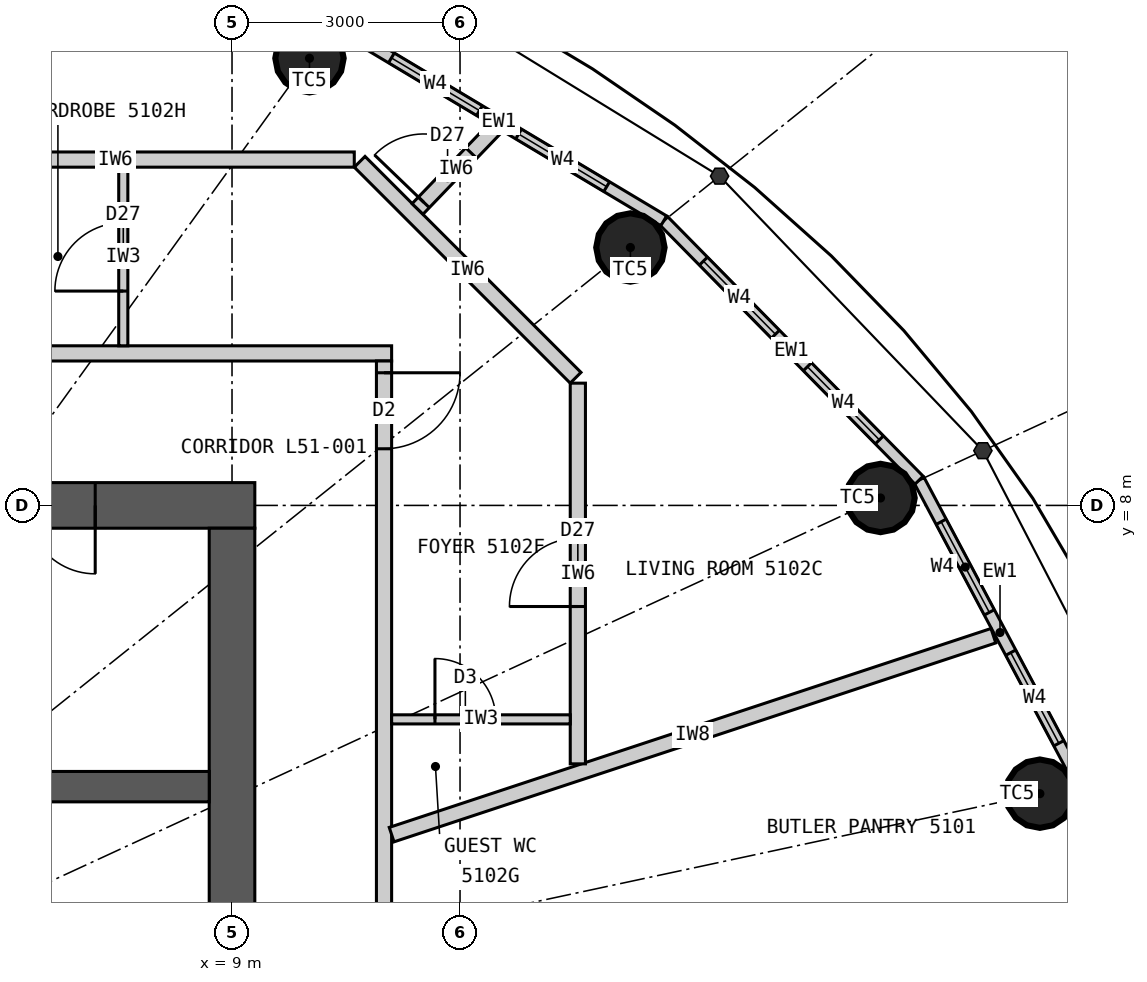
"""IFC4 building model, lengths in metres.
Left out: names, types, materials, properties, quantities, classifications, styles, units other than length and angle.
Written with IfcOpenShell. Run it as: python <this file> out.ifc"""

import sys

from ifc_helpers import new_model, si_unit, direction, frame, frame_2d, origin, origin_2d, place, context, subcontext, project, spatial, rectangle, circle, extrude, element, fill, save


model = new_model("IFC4")
c1 = context("Model", 3, precision=1e-05, world=origin(), true_north=direction((0.0, 1.0)))
c2 = subcontext(c1, "Body", "Model", "MODEL_VIEW")
j1 = project(units=[si_unit("LENGTHUNIT", "METRE"), si_unit("PLANEANGLEUNIT", "RADIAN")], contexts=[c1])
p1 = place(None, origin())
s1 = spatial("IfcSite", under=j1, at=p1, CompositionType="ELEMENT")
p2 = place(p1, origin())
s2 = spatial("IfcBuilding", under=s1, at=p2, CompositionType="ELEMENT")
p3 = place(p2, frame((0.0, 0.0, 192.9)))
s3 = spatial("IfcBuildingStorey", under=s2, at=p3, CompositionType="ELEMENT", Elevation=192.9)
for number, where, z_axis, x_axis in (
    (1, (19.629, 4.208, 0.0), (0.0, 0.0, 1.0), (1.0, 0.0, 0.0)),
    (2, (17.532, 8.098, 0.0), (0.0, 0.0, 1.0), (1.0, 0.0, 0.0)),
    (3, (14.241, 11.393, 0.0), (0.0, 0.0, 1.0), (1.0, 0.0, 0.0)),
    (4, (10.019, 13.883, 0.0), (0.0, 0.0, 1.0), (1.0, 0.0, 0.0)),
):
    element("IfcColumn", number, at=place(p3, frame(where, z_axis=z_axis, x_axis=x_axis)), inside=s3, PredefinedType="COLUMN", context=c2, shape_type="SweptSolid", body=[
        extrude(circle(Radius=0.45, at=origin_2d()), origin(), (0.0, 0.0, 1.0), 3.3),
    ])
p4 = place(p3, frame((-9.3, 8.0, 0.0), z_axis=(0.0, 0.0, 1.0), x_axis=(1.0, 0.0, 0.0)))
e5 = element("IfcWall", 5, at=p4, inside=s3, PredefinedType="SHEAR", context=c2, shape_type="SweptSolid", body=[
    extrude(rectangle(XDim=18.6, YDim=0.6, at=frame_2d((9.3, 0.0))), origin(), (0.0, 0.0, 1.0), 3.3),
])
p5 = place(p4, frame((8.0, 0.0, 0.0)))
e6 = element("IfcOpeningElement", 6, at=p5, cuts=e5, PredefinedType="OPENING", context=c2, shape_type="SweptSolid", body=[
    extrude(rectangle(XDim=1.2, YDim=2.2, at=frame_2d((0.6, 1.1))), frame((0.0, 0.31, 0.0), z_axis=(0.0, -1.0, 0.0), x_axis=(1.0, 0.0, 0.0)), (0.0, 0.0, 1.0), 0.62),
])
p6 = place(p4, frame((15.6, 0.0, 0.0)))
e7 = element("IfcOpeningElement", 7, at=p6, cuts=e5, PredefinedType="OPENING", context=c2, shape_type="SweptSolid", body=[
    extrude(rectangle(XDim=0.9, YDim=2.2, at=frame_2d((0.45, 1.1))), frame((0.0, 0.31, 0.0), z_axis=(0.0, -1.0, 0.0), x_axis=(1.0, 0.0, 0.0)), (0.0, 0.0, 1.0), 0.62),
])
p7 = place(p3, frame((9.0, -7.7, 0.0), z_axis=(0.0, 0.0, 1.0), x_axis=(0.0, 1.0, 0.0)))
e8 = element("IfcWall", 8, at=p7, inside=s3, PredefinedType="SHEAR", context=c2, shape_type="SweptSolid", body=[
    extrude(rectangle(XDim=15.4, YDim=0.6, at=frame_2d((7.7, 0.0))), origin(), (0.0, 0.0, 1.0), 3.3),
])
p8 = place(p7, frame((6.8, 0.0, 0.0)))
e9 = element("IfcOpeningElement", 9, at=p8, cuts=e8, PredefinedType="OPENING", context=c2, shape_type="SweptSolid", body=[
    extrude(rectangle(XDim=1.8, YDim=2.2, at=frame_2d((0.9, 1.1))), frame((0.0, 0.31, 0.0), z_axis=(0.0, -1.0, 0.0), x_axis=(1.0, 0.0, 0.0)), (0.0, 0.0, 1.0), 0.62),
])
p9 = place(p3, frame((-8.7, 4.3, 0.0), z_axis=(0.0, 0.0, 1.0), x_axis=(1.0, 0.0, 0.0)))
e10 = element("IfcWall", 10, at=p9, inside=s3, PredefinedType="SHEAR", context=c2, shape_type="SweptSolid", body=[
    extrude(rectangle(XDim=17.4, YDim=0.4, at=frame_2d((8.7, 0.0))), origin(), (0.0, 0.0, 1.0), 3.3),
])
p10 = place(p3, frame((20.17, 4.323, 0.0), z_axis=(0.0, 0.0, 1.0), x_axis=(-0.469256152955, 0.883062094597, 0.0)))
e11 = element("IfcWall", 11, at=p10, inside=s3, PredefinedType="ELEMENTEDWALL", context=c2, shape_type="SweptSolid", body=[
    extrude(rectangle(XDim=4.539, YDim=0.15, at=frame_2d((2.27, 0.0))), origin(), (0.0, 0.0, 1.0), 3.12),
])
p11 = place(p10, frame((0.62, 0.0, 0.9)))
e12 = element("IfcOpeningElement", 12, at=p11, cuts=e11, PredefinedType="OPENING", context=c2, shape_type="SweptSolid", body=[
    extrude(rectangle(XDim=1.35, YDim=1.9, at=frame_2d((0.675, 0.95))), frame((0.0, 0.085, 0.0), z_axis=(0.0, -1.0, 0.0), x_axis=(1.0, 0.0, 0.0)), (0.0, 0.0, 1.0), 0.17),
])
p12 = place(p10, frame((2.57, 0.0, 0.9)))
e13 = element("IfcOpeningElement", 13, at=p12, cuts=e11, PredefinedType="OPENING", context=c2, shape_type="SweptSolid", body=[
    extrude(rectangle(XDim=1.35, YDim=1.9, at=frame_2d((0.675, 0.95))), frame((0.0, 0.085, 0.0), z_axis=(0.0, -1.0, 0.0), x_axis=(1.0, 0.0, 0.0)), (0.0, 0.0, 1.0), 0.17),
])
p13 = place(p3, frame((18.04, 8.332, 0.0), z_axis=(0.0, 0.0, 1.0), x_axis=(-0.701527379618, 0.712642501993, 0.0)))
e14 = element("IfcWall", 14, at=p13, inside=s3, PredefinedType="ELEMENTEDWALL", context=c2, shape_type="SweptSolid", body=[
    extrude(rectangle(XDim=4.788, YDim=0.15, at=frame_2d((2.394, 0.0))), origin(), (0.0, 0.0, 1.0), 3.12),
])
p14 = place(p13, frame((0.744, 0.0, 0.9)))
e15 = element("IfcOpeningElement", 15, at=p14, cuts=e14, PredefinedType="OPENING", context=c2, shape_type="SweptSolid", body=[
    extrude(rectangle(XDim=1.35, YDim=1.9, at=frame_2d((0.675, 0.95))), frame((0.0, 0.085, 0.0), z_axis=(0.0, -1.0, 0.0), x_axis=(1.0, 0.0, 0.0)), (0.0, 0.0, 1.0), 0.17),
])
p15 = place(p13, frame((2.694, 0.0, 0.9)))
e16 = element("IfcOpeningElement", 16, at=p15, cuts=e14, PredefinedType="OPENING", context=c2, shape_type="SweptSolid", body=[
    extrude(rectangle(XDim=1.35, YDim=1.9, at=frame_2d((0.675, 0.95))), frame((0.0, 0.085, 0.0), z_axis=(0.0, -1.0, 0.0), x_axis=(1.0, 0.0, 0.0)), (0.0, 0.0, 1.0), 0.17),
])
p16 = place(p3, frame((14.68, 11.744, 0.0), z_axis=(0.0, 0.0, 1.0), x_axis=(-0.85822150553, 0.513279502265, 0.0)))
e17 = element("IfcWall", 17, at=p16, inside=s3, PredefinedType="ELEMENTEDWALL", context=c2, shape_type="SweptSolid", body=[
    extrude(rectangle(XDim=5.05, YDim=0.15, at=frame_2d((2.525, 0.0))), origin(), (0.0, 0.0, 1.0), 3.12),
])
p17 = place(p16, frame((0.875, 0.0, 0.9)))
e18 = element("IfcOpeningElement", 18, at=p17, cuts=e17, PredefinedType="OPENING", context=c2, shape_type="SweptSolid", body=[
    extrude(rectangle(XDim=1.35, YDim=1.9, at=frame_2d((0.675, 0.95))), frame((0.0, 0.085, 0.0), z_axis=(0.0, -1.0, 0.0), x_axis=(1.0, 0.0, 0.0)), (0.0, 0.0, 1.0), 0.17),
])
p18 = place(p16, frame((2.825, 0.0, 0.9)))
e19 = element("IfcOpeningElement", 19, at=p18, cuts=e17, PredefinedType="OPENING", context=c2, shape_type="SweptSolid", body=[
    extrude(rectangle(XDim=1.35, YDim=1.9, at=frame_2d((0.675, 0.95))), frame((0.0, 0.085, 0.0), z_axis=(0.0, -1.0, 0.0), x_axis=(1.0, 0.0, 0.0)), (0.0, 0.0, 1.0), 0.17),
])
p19 = place(p3, frame((-11.1, 10.0, 0.0), z_axis=(0.0, 0.0, 1.0), x_axis=(1.0, 0.0, 0.0)))
e20 = element("IfcWall", 20, at=p19, inside=s3, PredefinedType="PARTITIONING", context=c2, shape_type="SweptSolid", body=[
    extrude(rectangle(XDim=22.2, YDim=0.2, at=frame_2d((11.1, 0.0))), origin(), (0.0, 0.0, 1.0), 3.12),
])
p20 = place(p19, frame((11.36, 0.0, 0.0)))
e21 = element("IfcOpeningElement", 21, at=p20, cuts=e20, PredefinedType="OPENING", context=c2, shape_type="SweptSolid", body=[
    extrude(rectangle(XDim=1.0, YDim=2.2, at=frame_2d((0.5, 1.1))), frame((0.0, 0.11, 0.0), z_axis=(0.0, -1.0, 0.0), x_axis=(1.0, 0.0, 0.0)), (0.0, 0.0, 1.0), 0.22),
])
p21 = place(p19, frame((0.975, 0.0, 0.0)))
e22 = element("IfcOpeningElement", 22, at=p21, cuts=e20, PredefinedType="OPENING", context=c2, shape_type="SweptSolid", body=[
    extrude(rectangle(XDim=1.0, YDim=2.2, at=frame_2d((0.5, 1.1))), frame((0.0, 0.11, 0.0), z_axis=(0.0, -1.0, 0.0), x_axis=(1.0, 0.0, 0.0)), (0.0, 0.0, 1.0), 0.22),
])
p22 = place(p3, frame((11.0, -9.9, 0.0), z_axis=(0.0, 0.0, 1.0), x_axis=(0.0, 1.0, 0.0)))
e23 = element("IfcWall", 23, at=p22, inside=s3, PredefinedType="PARTITIONING", context=c2, shape_type="SweptSolid", body=[
    extrude(rectangle(XDim=19.8, YDim=0.2, at=frame_2d((9.9, 0.0))), origin(), (0.0, 0.0, 1.0), 3.12),
])
p23 = place(p22, frame((11.486, 0.0, 0.0)))
e24 = element("IfcOpeningElement", 24, at=p23, cuts=e23, PredefinedType="OPENING", context=c2, shape_type="SweptSolid", body=[
    extrude(rectangle(XDim=1.0, YDim=2.2, at=frame_2d((0.5, 1.1))), frame((0.0, 0.11, 0.0), z_axis=(0.0, -1.0, 0.0), x_axis=(1.0, 0.0, 0.0)), (0.0, 0.0, 1.0), 0.22),
])
p24 = place(p22, frame((18.645, 0.0, 0.0)))
e25 = element("IfcOpeningElement", 25, at=p24, cuts=e23, PredefinedType="OPENING", context=c2, shape_type="SweptSolid", body=[
    extrude(rectangle(XDim=1.0, YDim=2.2, at=frame_2d((0.5, 1.1))), frame((0.0, 0.11, 0.0), z_axis=(0.0, -1.0, 0.0), x_axis=(1.0, 0.0, 0.0)), (0.0, 0.0, 1.0), 0.22),
])
p25 = place(p22, frame((5.668, 0.0, 0.0)))
e26 = element("IfcOpeningElement", 26, at=p25, cuts=e23, PredefinedType="OPENING", context=c2, shape_type="SweptSolid", body=[
    extrude(rectangle(XDim=1.6, YDim=2.2, at=frame_2d((0.8, 1.1))), frame((0.0, 0.11, 0.0), z_axis=(0.0, -1.0, 0.0), x_axis=(1.0, 0.0, 0.0)), (0.0, 0.0, 1.0), 0.22),
])
p26 = place(p3, frame((11.1, 3.669, 0.0), z_axis=(0.0, 0.0, 1.0), x_axis=(0.949476668397, 0.313837627079, 0.0)))
e27 = element("IfcWall", 27, at=p26, inside=s3, PredefinedType="PARTITIONING", context=c2, shape_type="SweptSolid", body=[
    extrude(rectangle(XDim=8.339, YDim=0.2, at=frame_2d((4.169, 0.0))), origin(), (0.0, 0.0, 1.0), 3.12),
])
p27 = place(p3, frame((13.55, 4.6, 0.0), z_axis=(0.0, 0.0, 1.0), x_axis=(0.0, 1.0, 0.0)))
e28 = element("IfcWall", 28, at=p27, inside=s3, PredefinedType="PARTITIONING", context=c2, shape_type="SweptSolid", body=[
    extrude(rectangle(XDim=5.009, YDim=0.2, at=frame_2d((2.504, 0.0))), origin(), (0.0, 0.0, 1.0), 3.12),
])
p28 = place(p27, frame((2.07, 0.0, 0.0)))
e29 = element("IfcOpeningElement", 29, at=p28, cuts=e28, PredefinedType="OPENING", context=c2, shape_type="SweptSolid", body=[
    extrude(rectangle(XDim=0.9, YDim=2.1, at=frame_2d((0.45, 1.05))), frame((0.0, 0.11, 0.0), z_axis=(0.0, -1.0, 0.0), x_axis=(1.0, 0.0, 0.0)), (0.0, 0.0, 1.0), 0.22),
])
p29 = place(p3, frame((13.521, 9.679, 0.0), z_axis=(0.0, 0.0, 1.0), x_axis=(-0.707106781187, 0.707106781187, 0.0)))
e30 = element("IfcWall", 30, at=p29, inside=s3, PredefinedType="PARTITIONING", context=c2, shape_type="SweptSolid", body=[
    extrude(rectangle(XDim=4.019, YDim=0.2, at=frame_2d((2.009, 0.0))), origin(), (0.0, 0.0, 1.0), 3.12),
])
p30 = place(p3, frame((10.609, 12.55, 0.0), z_axis=(0.0, 0.0, 1.0), x_axis=(-1.0, 0.0, 0.0)))
e31 = element("IfcWall", 31, at=p30, inside=s3, PredefinedType="PARTITIONING", context=c2, shape_type="SweptSolid", body=[
    extrude(rectangle(XDim=6.284, YDim=0.2, at=frame_2d((3.142, 0.0))), origin(), (0.0, 0.0, 1.0), 3.12),
])
p31 = place(p30, frame((4.944, 0.0, 0.0)))
e32 = element("IfcOpeningElement", 32, at=p31, cuts=e31, PredefinedType="OPENING", context=c2, shape_type="SweptSolid", body=[
    extrude(rectangle(XDim=0.8, YDim=2.1, at=frame_2d((0.4, 1.05))), frame((0.0, 0.11, 0.0), z_axis=(0.0, -1.0, 0.0), x_axis=(1.0, 0.0, 0.0)), (0.0, 0.0, 1.0), 0.22),
])
p32 = place(p3, frame((11.441, 11.9, 0.0), z_axis=(0.0, 0.0, 1.0), x_axis=(0.692958717259, 0.720977264672, 0.0)))
e33 = element("IfcWall", 33, at=p32, inside=s3, PredefinedType="PARTITIONING", context=c2, shape_type="SweptSolid", body=[
    extrude(rectangle(XDim=1.464, YDim=0.2, at=frame_2d((0.732, 0.0))), origin(), (0.0, 0.0, 1.0), 3.12),
])
p33 = place(p32, frame((0.12, 0.0, 0.0)))
e34 = element("IfcOpeningElement", 34, at=p33, cuts=e33, PredefinedType="OPENING", context=c2, shape_type="SweptSolid", body=[
    extrude(rectangle(XDim=0.9, YDim=2.1, at=frame_2d((0.45, 1.05))), frame((0.0, 0.11, 0.0), z_axis=(0.0, -1.0, 0.0), x_axis=(1.0, 0.0, 0.0)), (0.0, 0.0, 1.0), 0.22),
])
p34 = place(p3, frame((11.1, 5.185, 0.0), z_axis=(0.0, 0.0, 1.0), x_axis=(1.0, 0.0, 0.0)))
e35 = element("IfcWall", 35, at=p34, inside=s3, PredefinedType="PARTITIONING", context=c2, shape_type="SweptSolid", body=[
    extrude(rectangle(XDim=2.35, YDim=0.12, at=frame_2d((1.175, 0.0))), origin(), (0.0, 0.0, 1.0), 3.12),
])
p35 = place(p34, frame((0.57, 0.0, 0.0)))
e36 = element("IfcOpeningElement", 36, at=p35, cuts=e35, PredefinedType="OPENING", context=c2, shape_type="SweptSolid", body=[
    extrude(rectangle(XDim=0.8, YDim=2.1, at=frame_2d((0.4, 1.05))), frame((0.0, 0.07, 0.0), z_axis=(0.0, -1.0, 0.0), x_axis=(1.0, 0.0, 0.0)), (0.0, 0.0, 1.0), 0.14),
])
p36 = place(p3, frame((7.569, 10.1, 0.0), z_axis=(0.0, 0.0, 1.0), x_axis=(0.0, 1.0, 0.0)))
e37 = element("IfcWall", 37, at=p36, inside=s3, PredefinedType="PARTITIONING", context=c2, shape_type="SweptSolid", body=[
    extrude(rectangle(XDim=2.35, YDim=0.12, at=frame_2d((1.175, 0.0))), origin(), (0.0, 0.0, 1.0), 3.12),
])
p37 = place(p36, frame((0.72, 0.0, 0.0)))
e38 = element("IfcOpeningElement", 38, at=p37, cuts=e37, PredefinedType="OPENING", context=c2, shape_type="SweptSolid", body=[
    extrude(rectangle(XDim=0.9, YDim=2.1, at=frame_2d((0.45, 1.05))), frame((0.0, 0.07, 0.0), z_axis=(0.0, -1.0, 0.0), x_axis=(1.0, 0.0, 0.0)), (0.0, 0.0, 1.0), 0.14),
])
p38 = place(p11, origin())
e39 = element("IfcWindow", 39, at=p38, inside=s3, PartitioningType="SINGLE_PANEL", PredefinedType="WINDOW", context=c2, shape_type="SweptSolid", body=[
    extrude(rectangle(XDim=1.35, YDim=1.9, at=frame_2d((0.675, 0.95))), frame((0.0, 0.03, 0.0), z_axis=(0.0, -1.0, 0.0), x_axis=(1.0, 0.0, 0.0)), (0.0, 0.0, 1.0), 0.06),
])
fill(e12, e39)
p39 = place(p12, origin())
e40 = element("IfcWindow", 40, at=p39, inside=s3, PartitioningType="SINGLE_PANEL", PredefinedType="WINDOW", context=c2, shape_type="SweptSolid", body=[
    extrude(rectangle(XDim=1.35, YDim=1.9, at=frame_2d((0.675, 0.95))), frame((0.0, 0.03, 0.0), z_axis=(0.0, -1.0, 0.0), x_axis=(1.0, 0.0, 0.0)), (0.0, 0.0, 1.0), 0.06),
])
fill(e13, e40)
p40 = place(p14, origin())
e41 = element("IfcWindow", 41, at=p40, inside=s3, PartitioningType="SINGLE_PANEL", PredefinedType="WINDOW", context=c2, shape_type="SweptSolid", body=[
    extrude(rectangle(XDim=1.35, YDim=1.9, at=frame_2d((0.675, 0.95))), frame((0.0, 0.03, 0.0), z_axis=(0.0, -1.0, 0.0), x_axis=(1.0, 0.0, 0.0)), (0.0, 0.0, 1.0), 0.06),
])
fill(e15, e41)
p41 = place(p15, origin())
e42 = element("IfcWindow", 42, at=p41, inside=s3, PartitioningType="SINGLE_PANEL", PredefinedType="WINDOW", context=c2, shape_type="SweptSolid", body=[
    extrude(rectangle(XDim=1.35, YDim=1.9, at=frame_2d((0.675, 0.95))), frame((0.0, 0.03, 0.0), z_axis=(0.0, -1.0, 0.0), x_axis=(1.0, 0.0, 0.0)), (0.0, 0.0, 1.0), 0.06),
])
fill(e16, e42)
p42 = place(p17, origin())
e43 = element("IfcWindow", 43, at=p42, inside=s3, PartitioningType="SINGLE_PANEL", PredefinedType="WINDOW", context=c2, shape_type="SweptSolid", body=[
    extrude(rectangle(XDim=1.35, YDim=1.9, at=frame_2d((0.675, 0.95))), frame((0.0, 0.03, 0.0), z_axis=(0.0, -1.0, 0.0), x_axis=(1.0, 0.0, 0.0)), (0.0, 0.0, 1.0), 0.06),
])
fill(e18, e43)
p43 = place(p18, origin())
e44 = element("IfcWindow", 44, at=p43, inside=s3, PartitioningType="SINGLE_PANEL", PredefinedType="WINDOW", context=c2, shape_type="SweptSolid", body=[
    extrude(rectangle(XDim=1.35, YDim=1.9, at=frame_2d((0.675, 0.95))), frame((0.0, 0.03, 0.0), z_axis=(0.0, -1.0, 0.0), x_axis=(1.0, 0.0, 0.0)), (0.0, 0.0, 1.0), 0.06),
])
fill(e19, e44)
p44 = place(p24, origin())
e45 = element("IfcDoor", 45, at=p44, inside=s3, OperationType="SINGLE_SWING_RIGHT", PredefinedType="DOOR", context=c2, shape_type="SweptSolid", body=[
    extrude(rectangle(XDim=1.0, YDim=2.2, at=frame_2d((0.5, 1.1))), frame((0.0, 0.025, 0.0), z_axis=(0.0, -1.0, 0.0), x_axis=(1.0, 0.0, 0.0)), (0.0, 0.0, 1.0), 0.05),
])
fill(e25, e45)
p45 = place(p35, origin())
e46 = element("IfcDoor", 46, at=p45, inside=s3, OperationType="SINGLE_SWING_LEFT", PredefinedType="DOOR", context=c2, shape_type="SweptSolid", body=[
    extrude(rectangle(XDim=0.8, YDim=2.1, at=frame_2d((0.4, 1.05))), frame((0.0, 0.025, 0.0), z_axis=(0.0, -1.0, 0.0), x_axis=(1.0, 0.0, 0.0)), (0.0, 0.0, 1.0), 0.05),
])
fill(e36, e46)
p46 = place(p37, origin())
e47 = element("IfcDoor", 47, at=p46, inside=s3, OperationType="SINGLE_SWING_LEFT", PredefinedType="DOOR", context=c2, shape_type="SweptSolid", body=[
    extrude(rectangle(XDim=0.9, YDim=2.1, at=frame_2d((0.45, 1.05))), frame((0.0, 0.025, 0.0), z_axis=(0.0, -1.0, 0.0), x_axis=(1.0, 0.0, 0.0)), (0.0, 0.0, 1.0), 0.05),
])
fill(e38, e47)
p47 = place(p28, origin())
e48 = element("IfcDoor", 48, at=p47, inside=s3, OperationType="SINGLE_SWING_LEFT", PredefinedType="DOOR", context=c2, shape_type="SweptSolid", body=[
    extrude(rectangle(XDim=0.9, YDim=2.1, at=frame_2d((0.45, 1.05))), frame((0.0, 0.025, 0.0), z_axis=(0.0, -1.0, 0.0), x_axis=(1.0, 0.0, 0.0)), (0.0, 0.0, 1.0), 0.05),
])
fill(e29, e48)
p48 = place(p33, origin())
e49 = element("IfcDoor", 49, at=p48, inside=s3, OperationType="SINGLE_SWING_LEFT", PredefinedType="DOOR", context=c2, shape_type="SweptSolid", body=[
    extrude(rectangle(XDim=0.9, YDim=2.1, at=frame_2d((0.45, 1.05))), frame((0.0, 0.025, 0.0), z_axis=(0.0, -1.0, 0.0), x_axis=(1.0, 0.0, 0.0)), (0.0, 0.0, 1.0), 0.05),
])
fill(e34, e49)
p49 = place(p6, origin())
e50 = element("IfcDoor", 50, at=p49, inside=s3, OperationType="SINGLE_SWING_RIGHT", PredefinedType="DOOR", context=c2, shape_type="SweptSolid", body=[
    extrude(rectangle(XDim=0.9, YDim=2.2, at=frame_2d((0.45, 1.1))), frame((0.0, 0.025, 0.0), z_axis=(0.0, -1.0, 0.0), x_axis=(1.0, 0.0, 0.0)), (0.0, 0.0, 1.0), 0.05),
])
fill(e7, e50)
save(model, sys.argv[1])
